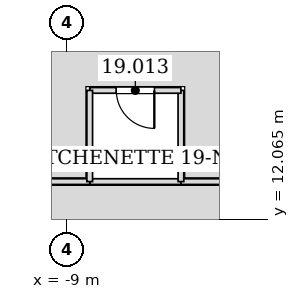
"""IFC4 building model, lengths in metres.
Left out: names, types, materials, properties, quantities, classifications, styles, units other than length and angle.
Written with IfcOpenShell. Run it as: python <this file> out.ifc"""

import sys

from ifc_helpers import new_model, si_unit, direction, frame, frame_2d, origin, place, context, subcontext, project, spatial, rectangle, extrude, element, fill, save


model = new_model("IFC4")
c1 = context("Model", 3, precision=1e-05, world=origin(), true_north=direction((0.0, 1.0)))
c2 = subcontext(c1, "Body", "Model", "MODEL_VIEW")
j1 = project(units=[si_unit("LENGTHUNIT", "METRE"), si_unit("PLANEANGLEUNIT", "RADIAN")], contexts=[c1])
p1 = place(None, origin())
s1 = spatial("IfcSite", under=j1, at=p1, CompositionType="ELEMENT")
p2 = place(p1, origin())
s2 = spatial("IfcBuilding", under=s1, at=p2, CompositionType="ELEMENT")
p3 = place(p2, frame((0.0, 0.0, 87.6)))
s3 = spatial("IfcBuildingStorey", under=s2, at=p3, CompositionType="ELEMENT", Elevation=87.6)
p4 = place(p3, frame((-5.999, 13.05, 0.0), z_axis=(0.0, 0.0, 1.0), x_axis=(-1.0, 0.0, 0.0)))
e1 = element("IfcWall", 1, at=p4, inside=s3, PredefinedType="PARTITIONING", context=c2, shape_type="SweptSolid", body=[
    extrude(rectangle(XDim=2.402, YDim=0.15, at=frame_2d((1.201, 0.0))), origin(), (0.0, 0.0, 1.0), 4.035),
])
p5 = place(p3, frame((-8.399, 13.05, 0.0), z_axis=(0.0, 0.0, 1.0), x_axis=(-1.0, 0.0, 0.0)))
e2 = element("IfcWall", 2, at=p5, inside=s3, PredefinedType="PARTITIONING", context=c2, shape_type="SweptSolid", body=[
    extrude(rectangle(XDim=4.651, YDim=0.15, at=frame_2d((2.326, 0.0))), origin(), (0.0, 0.0, 1.0), 3.014),
])
p6 = place(p3, frame((0.001, 13.05, 0.0), z_axis=(0.0, 0.0, 1.0), x_axis=(-1.0, 0.0, 0.0)))
e3 = element("IfcWall", 3, at=p6, inside=s3, PredefinedType="PARTITIONING", context=c2, shape_type="SweptSolid", body=[
    extrude(rectangle(XDim=6.002, YDim=0.15, at=frame_2d((3.001, 0.0))), origin(), (0.0, 0.0, 1.0), 3.065),
])
p7 = place(p6, frame((2.101, 0.0, 0.0)))
e4 = element("IfcOpeningElement", 4, at=p7, cuts=e3, PredefinedType="OPENING", context=c2, shape_type="SweptSolid", body=[
    extrude(rectangle(XDim=1.8, YDim=2.4, at=frame_2d((0.9, 1.2))), frame((0.0, 0.085, 0.0), z_axis=(0.0, -1.0, 0.0), x_axis=(1.0, 0.0, 0.0)), (0.0, 0.0, 1.0), 0.17),
])
p8 = place(p3, frame((-6.0, 13.05, 0.0), z_axis=(0.0, 0.0, 1.0), x_axis=(0.0, 1.0, 0.0)))
e5 = element("IfcWall", 5, at=p8, inside=s3, PredefinedType="PARTITIONING", context=c2, shape_type="SweptSolid", body=[
    extrude(rectangle(XDim=2.4, YDim=0.15, at=frame_2d((1.2, 0.0))), origin(), (0.0, 0.0, 1.0), 3.491),
])
p9 = place(p3, frame((-6.0, 15.45, 0.0), z_axis=(0.0, 0.0, 1.0), x_axis=(-1.0, 0.0, 0.0)))
e6 = element("IfcWall", 6, at=p9, inside=s3, PredefinedType="PARTITIONING", context=c2, shape_type="SweptSolid", body=[
    extrude(rectangle(XDim=2.4, YDim=0.15, at=frame_2d((1.2, 0.0))), origin(), (0.0, 0.0, 1.0), 4.035),
])
p10 = place(p9, frame((0.7, 0.0, 0.0)))
e7 = element("IfcOpeningElement", 7, at=p10, cuts=e6, PredefinedType="OPENING", context=c2, shape_type="SweptSolid", body=[
    extrude(rectangle(XDim=1.0, YDim=2.1, at=frame_2d((0.5, 1.05))), frame((0.0, 0.085, 0.0), z_axis=(0.0, -1.0, 0.0), x_axis=(1.0, 0.0, 0.0)), (0.0, 0.0, 1.0), 0.17),
])
p11 = place(p3, frame((-8.4, 15.45, 0.0), z_axis=(0.0, 0.0, 1.0), x_axis=(0.0, -1.0, 0.0)))
e8 = element("IfcWall", 8, at=p11, inside=s3, PredefinedType="PARTITIONING", context=c2, shape_type="SweptSolid", body=[
    extrude(rectangle(XDim=2.4, YDim=0.15, at=frame_2d((1.2, 0.0))), origin(), (0.0, 0.0, 1.0), 3.491),
])
p12 = place(p10, origin())
e9 = element("IfcDoor", 9, at=p12, inside=s3, OperationType="SINGLE_SWING_LEFT", PredefinedType="DOOR", context=c2, shape_type="SweptSolid", body=[
    extrude(rectangle(XDim=1.0, YDim=2.1, at=frame_2d((0.5, 1.05))), frame((0.0, 0.025, 0.0), z_axis=(0.0, -1.0, 0.0), x_axis=(1.0, 0.0, 0.0)), (0.0, 0.0, 1.0), 0.05),
])
fill(e7, e9)
save(model, sys.argv[1])
